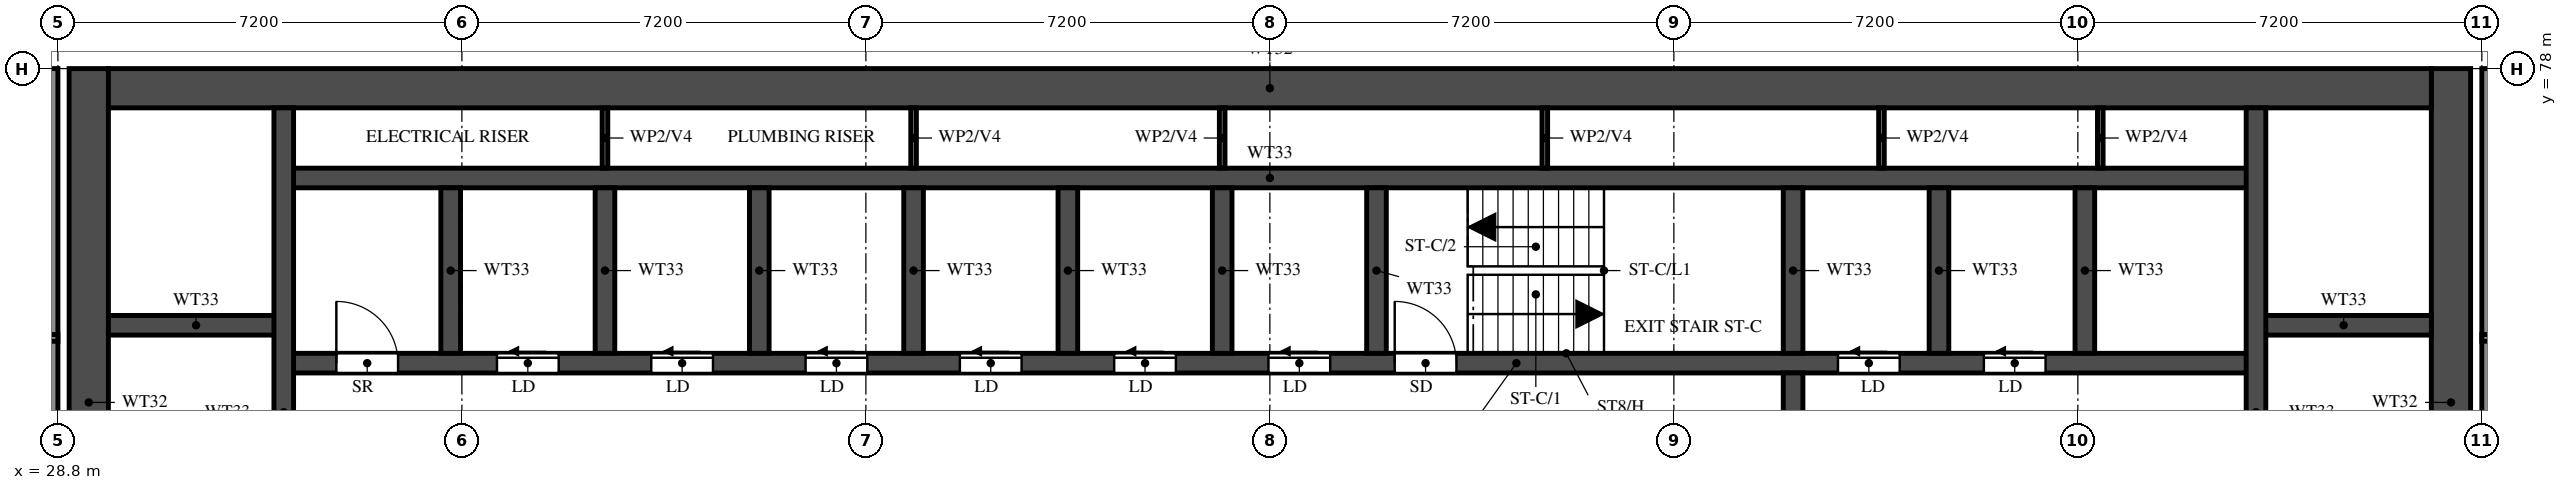
"""IFC4 building model, lengths in metres.
Left out: names, types, materials, properties, quantities, classifications, styles, units other than length and angle.
Written with IfcOpenShell. Run it as: python <this file> out.ifc"""

import sys

from ifc_helpers import new_model, si_unit, direction, frame, frame_2d, origin, place, context, subcontext, project, spatial, rectangle, extrude, element, fill, save


model = new_model("IFC4")
c1 = context("Model", 3, precision=1e-05, world=origin(), true_north=direction((0.0, 1.0)))
c2 = subcontext(c1, "Body", "Model", "MODEL_VIEW")
j1 = project(units=[si_unit("LENGTHUNIT", "METRE"), si_unit("PLANEANGLEUNIT", "RADIAN")], contexts=[c1])
p1 = place(None, origin())
s1 = spatial("IfcSite", under=j1, at=p1, CompositionType="ELEMENT")
p2 = place(p1, origin())
s2 = spatial("IfcBuilding", under=s1, at=p2, CompositionType="ELEMENT")
p3 = place(p2, frame((0.0, 0.0, 202.5)))
s3 = spatial("IfcBuildingStorey", under=s2, at=p3, CompositionType="ELEMENT", Elevation=202.5)
for number, where, z_axis, x_axis in (
    (1, (29.35, 66.1, 0.0), (0.0, 0.0, 1.0), (0.0, 1.0, 0.0)),
    (2, (71.45, 66.1, 0.0), (0.0, 0.0, 1.0), (0.0, 1.0, 0.0)),
):
    element("IfcWall", number, at=place(p3, frame(where, z_axis=z_axis, x_axis=x_axis)), inside=s3, PredefinedType="SHEAR", context=c2, shape_type="SweptSolid", body=[
        extrude(rectangle(XDim=11.9, YDim=0.7, at=frame_2d((5.95, 0.0))), origin(), (0.0, 0.0, 1.0), 3.1),
    ])
p4 = place(p3, frame((29.7, 77.65, 0.0), z_axis=(0.0, 0.0, 1.0), x_axis=(1.0, 0.0, 0.0)))
e3 = element("IfcWall", 3, at=p4, inside=s3, PredefinedType="SHEAR", context=c2, shape_type="SweptSolid", body=[
    extrude(rectangle(XDim=41.4, YDim=0.7, at=frame_2d((20.7, 0.0))), origin(), (0.0, 0.0, 1.0), 3.1),
])
p5 = place(p3, frame((32.825, 72.75, 0.0), z_axis=(0.0, 0.0, 1.0), x_axis=(1.0, 0.0, 0.0)))
e4 = element("IfcWall", 4, at=p5, inside=s3, PredefinedType="SHEAR", context=c2, shape_type="SweptSolid", body=[
    extrude(rectangle(XDim=35.15, YDim=0.35, at=frame_2d((17.575, 0.0))), origin(), (0.0, 0.0, 1.0), 3.1),
])
p6 = place(p5, frame((19.8, 0.0, 0.0)))
e5 = element("IfcOpeningElement", 5, at=p6, cuts=e4, PredefinedType="OPENING", context=c2, shape_type="SweptSolid", body=[
    extrude(rectangle(XDim=1.1, YDim=2.1, at=frame_2d((0.55, 1.05))), frame((0.0, 0.185, 0.0), z_axis=(0.0, -1.0, 0.0), x_axis=(1.0, 0.0, 0.0)), (0.0, 0.0, 1.0), 0.37),
])
p7 = place(p5, frame((27.7, 0.0, 0.0)))
e6 = element("IfcOpeningElement", 6, at=p7, cuts=e4, PredefinedType="OPENING", context=c2, shape_type="SweptSolid", body=[
    extrude(rectangle(XDim=1.1, YDim=2.1, at=frame_2d((0.55, 1.05))), frame((0.0, 0.185, 0.0), z_axis=(0.0, -1.0, 0.0), x_axis=(1.0, 0.0, 0.0)), (0.0, 0.0, 1.0), 0.37),
])
p8 = place(p5, frame((30.3, 0.0, 0.0)))
e7 = element("IfcOpeningElement", 7, at=p8, cuts=e4, PredefinedType="OPENING", context=c2, shape_type="SweptSolid", body=[
    extrude(rectangle(XDim=1.1, YDim=2.1, at=frame_2d((0.55, 1.05))), frame((0.0, 0.185, 0.0), z_axis=(0.0, -1.0, 0.0), x_axis=(1.0, 0.0, 0.0)), (0.0, 0.0, 1.0), 0.37),
])
p9 = place(p5, frame((3.8, 0.0, 0.0)))
e8 = element("IfcOpeningElement", 8, at=p9, cuts=e4, PredefinedType="OPENING", context=c2, shape_type="SweptSolid", body=[
    extrude(rectangle(XDim=1.1, YDim=2.1, at=frame_2d((0.55, 1.05))), frame((0.0, 0.185, 0.0), z_axis=(0.0, -1.0, 0.0), x_axis=(1.0, 0.0, 0.0)), (0.0, 0.0, 1.0), 0.37),
])
p10 = place(p5, frame((6.55, 0.0, 0.0)))
e9 = element("IfcOpeningElement", 9, at=p10, cuts=e4, PredefinedType="OPENING", context=c2, shape_type="SweptSolid", body=[
    extrude(rectangle(XDim=1.1, YDim=2.1, at=frame_2d((0.55, 1.05))), frame((0.0, 0.185, 0.0), z_axis=(0.0, -1.0, 0.0), x_axis=(1.0, 0.0, 0.0)), (0.0, 0.0, 1.0), 0.37),
])
p11 = place(p5, frame((9.3, 0.0, 0.0)))
e10 = element("IfcOpeningElement", 10, at=p11, cuts=e4, PredefinedType="OPENING", context=c2, shape_type="SweptSolid", body=[
    extrude(rectangle(XDim=1.1, YDim=2.1, at=frame_2d((0.55, 1.05))), frame((0.0, 0.185, 0.0), z_axis=(0.0, -1.0, 0.0), x_axis=(1.0, 0.0, 0.0)), (0.0, 0.0, 1.0), 0.37),
])
p12 = place(p5, frame((12.05, 0.0, 0.0)))
e11 = element("IfcOpeningElement", 11, at=p12, cuts=e4, PredefinedType="OPENING", context=c2, shape_type="SweptSolid", body=[
    extrude(rectangle(XDim=1.1, YDim=2.1, at=frame_2d((0.55, 1.05))), frame((0.0, 0.185, 0.0), z_axis=(0.0, -1.0, 0.0), x_axis=(1.0, 0.0, 0.0)), (0.0, 0.0, 1.0), 0.37),
])
p13 = place(p5, frame((14.8, 0.0, 0.0)))
e12 = element("IfcOpeningElement", 12, at=p13, cuts=e4, PredefinedType="OPENING", context=c2, shape_type="SweptSolid", body=[
    extrude(rectangle(XDim=1.1, YDim=2.1, at=frame_2d((0.55, 1.05))), frame((0.0, 0.185, 0.0), z_axis=(0.0, -1.0, 0.0), x_axis=(1.0, 0.0, 0.0)), (0.0, 0.0, 1.0), 0.37),
])
p14 = place(p5, frame((17.55, 0.0, 0.0)))
e13 = element("IfcOpeningElement", 13, at=p14, cuts=e4, PredefinedType="OPENING", context=c2, shape_type="SweptSolid", body=[
    extrude(rectangle(XDim=1.1, YDim=2.1, at=frame_2d((0.55, 1.05))), frame((0.0, 0.185, 0.0), z_axis=(0.0, -1.0, 0.0), x_axis=(1.0, 0.0, 0.0)), (0.0, 0.0, 1.0), 0.37),
])
p15 = place(p5, frame((0.938, 0.0, 0.0)))
e14 = element("IfcOpeningElement", 14, at=p15, cuts=e4, PredefinedType="OPENING", context=c2, shape_type="SweptSolid", body=[
    extrude(rectangle(XDim=1.1, YDim=2.1, at=frame_2d((0.55, 1.05))), frame((0.0, 0.185, 0.0), z_axis=(0.0, -1.0, 0.0), x_axis=(1.0, 0.0, 0.0)), (0.0, 0.0, 1.0), 0.37),
])
p16 = place(p3, frame((32.825, 76.05, 0.0), z_axis=(0.0, 0.0, 1.0), x_axis=(1.0, 0.0, 0.0)))
e15 = element("IfcWall", 15, at=p16, inside=s3, PredefinedType="SHEAR", context=c2, shape_type="SweptSolid", body=[
    extrude(rectangle(XDim=35.15, YDim=0.35, at=frame_2d((17.575, 0.0))), origin(), (0.0, 0.0, 1.0), 3.1),
])
for number, where, z_axis, x_axis in (
    (16, (29.7, 73.425, 0.0), (0.0, 0.0, 1.0), (1.0, 0.0, 0.0)),
    (17, (67.975, 73.425, 0.0), (0.0, 0.0, 1.0), (1.0, 0.0, 0.0)),
):
    element("IfcWall", number, at=place(p3, frame(where, z_axis=z_axis, x_axis=x_axis)), inside=s3, PredefinedType="SHEAR", context=c2, shape_type="SweptSolid", body=[
        extrude(rectangle(XDim=3.125, YDim=0.35, at=frame_2d((1.562, 0.0))), origin(), (0.0, 0.0, 1.0), 3.1),
    ])
p17 = place(p3, frame((32.825, 66.45, 0.0), z_axis=(0.0, 0.0, 1.0), x_axis=(0.0, 1.0, 0.0)))
e18 = element("IfcWall", 18, at=p17, inside=s3, PredefinedType="SHEAR", context=c2, shape_type="SweptSolid", body=[
    extrude(rectangle(XDim=10.85, YDim=0.35, at=frame_2d((5.425, 0.0))), origin(), (0.0, 0.0, 1.0), 3.1),
])
p18 = place(p3, frame((67.975, 66.45, 0.0), z_axis=(0.0, 0.0, 1.0), x_axis=(0.0, 1.0, 0.0)))
e19 = element("IfcWall", 19, at=p18, inside=s3, PredefinedType="SHEAR", context=c2, shape_type="SweptSolid", body=[
    extrude(rectangle(XDim=10.85, YDim=0.35, at=frame_2d((5.425, 0.0))), origin(), (0.0, 0.0, 1.0), 3.1),
])
p19 = place(p18, frame((0.15, 0.0, 0.0)))
e20 = element("IfcOpeningElement", 20, at=p19, cuts=e19, PredefinedType="OPENING", context=c2, shape_type="SweptSolid", body=[
    extrude(rectangle(XDim=1.1, YDim=2.1, at=frame_2d((0.55, 1.05))), frame((0.0, 0.185, 0.0), z_axis=(0.0, -1.0, 0.0), x_axis=(1.0, 0.0, 0.0)), (0.0, 0.0, 1.0), 0.37),
])
p20 = place(p3, frame((59.725, 66.45, 0.0), z_axis=(0.0, 0.0, 1.0), x_axis=(0.0, 1.0, 0.0)))
e21 = element("IfcWall", 21, at=p20, inside=s3, PredefinedType="SHEAR", context=c2, shape_type="SweptSolid", body=[
    extrude(rectangle(XDim=6.125, YDim=0.35, at=frame_2d((3.062, 0.0))), origin(), (0.0, 0.0, 1.0), 3.1),
])
p21 = place(p20, frame((3.85, 0.0, 0.0)))
e22 = element("IfcOpeningElement", 22, at=p21, cuts=e21, PredefinedType="OPENING", context=c2, shape_type="SweptSolid", body=[
    extrude(rectangle(XDim=1.2, YDim=2.1, at=frame_2d((0.6, 1.05))), frame((0.0, 0.185, 0.0), z_axis=(0.0, -1.0, 0.0), x_axis=(1.0, 0.0, 0.0)), (0.0, 0.0, 1.0), 0.37),
])
for number, where, z_axis, x_axis in (
    (23, (59.725, 72.925, 0.0), (0.0, 0.0, 1.0), (0.0, 1.0, 0.0)),
    (24, (35.8, 72.925, 0.0), (0.0, 0.0, 1.0), (0.0, 1.0, 0.0)),
    (25, (38.55, 72.925, 0.0), (0.0, 0.0, 1.0), (0.0, 1.0, 0.0)),
    (26, (41.3, 72.925, 0.0), (0.0, 0.0, 1.0), (0.0, 1.0, 0.0)),
    (27, (44.05, 72.925, 0.0), (0.0, 0.0, 1.0), (0.0, 1.0, 0.0)),
    (28, (46.8, 72.925, 0.0), (0.0, 0.0, 1.0), (0.0, 1.0, 0.0)),
    (29, (49.55, 72.925, 0.0), (0.0, 0.0, 1.0), (0.0, 1.0, 0.0)),
    (30, (52.3, 72.925, 0.0), (0.0, 0.0, 1.0), (0.0, 1.0, 0.0)),
    (31, (62.325, 72.925, 0.0), (0.0, 0.0, 1.0), (0.0, 1.0, 0.0)),
    (32, (64.925, 72.925, 0.0), (0.0, 0.0, 1.0), (0.0, 1.0, 0.0)),
):
    element("IfcWall", number, at=place(p3, frame(where, z_axis=z_axis, x_axis=x_axis)), inside=s3, PredefinedType="SHEAR", context=c2, shape_type="SweptSolid", body=[
        extrude(rectangle(XDim=2.95, YDim=0.35, at=frame_2d((1.475, 0.0))), origin(), (0.0, 0.0, 1.0), 3.1),
    ])
for number, where, z_axis, x_axis in (
    (33, (38.55, 76.225, 0.0), (0.0, 0.0, 1.0), (0.0, 1.0, 0.0)),
    (34, (44.05, 76.225, 0.0), (0.0, 0.0, 1.0), (0.0, 1.0, 0.0)),
    (35, (49.55, 76.225, 0.0), (0.0, 0.0, 1.0), (0.0, 1.0, 0.0)),
    (36, (55.3, 76.225, 0.0), (0.0, 0.0, 1.0), (0.0, 1.0, 0.0)),
    (37, (61.3, 76.225, 0.0), (0.0, 0.0, 1.0), (0.0, 1.0, 0.0)),
    (38, (65.2, 76.225, 0.0), (0.0, 0.0, 1.0), (0.0, 1.0, 0.0)),
):
    element("IfcWall", number, at=place(p3, frame(where, z_axis=z_axis, x_axis=x_axis)), inside=s3, PredefinedType="PARTITIONING", context=c2, shape_type="SweptSolid", body=[
        extrude(rectangle(XDim=1.075, YDim=0.1, at=frame_2d((0.538, 0.0))), origin(), (0.0, 0.0, 1.0), 3.1),
    ])
for number, where, z_axis, x_axis in (
    (39, (28.7, 62.4, 0.0), (0.0, 0.0, 1.0), (0.0, 1.0, 0.0)),
    (40, (72.1, 62.4, 0.0), (0.0, 0.0, 1.0), (0.0, 1.0, 0.0)),
):
    element("IfcWall", number, at=place(p3, frame(where, z_axis=z_axis, x_axis=x_axis)), inside=s3, PredefinedType="SOLIDWALL", context=c2, shape_type="SweptSolid", body=[
        extrude(rectangle(XDim=15.6, YDim=0.2, at=frame_2d((7.8, 0.0))), origin(), (0.0, 0.0, 1.0), 3.1),
    ])
p22 = place(p3, frame((14.525, 73.2, 0.0), z_axis=(0.0, 0.0, 1.0), x_axis=(1.0, 0.0, 0.0)))
e41 = element("IfcWall", 41, at=p22, inside=s3, PredefinedType="PARTITIONING", context=c2, shape_type="SweptSolid", body=[
    extrude(rectangle(XDim=14.275, YDim=0.12, at=frame_2d((7.138, 0.0))), origin(), (0.0, 0.0, 1.0), 3.1),
])
p23 = place(p22, frame((7.675, 0.0, 0.0)))
e42 = element("IfcOpeningElement", 42, at=p23, cuts=e41, PredefinedType="OPENING", context=c2, shape_type="SweptSolid", body=[
    extrude(rectangle(XDim=0.9, YDim=2.1, at=frame_2d((0.45, 1.05))), frame((0.0, 0.07, 0.0), z_axis=(0.0, -1.0, 0.0), x_axis=(1.0, 0.0, 0.0)), (0.0, 0.0, 1.0), 0.14),
])
p24 = place(p3, frame((72.0, 73.2, 0.0), z_axis=(0.0, 0.0, 1.0), x_axis=(1.0, 0.0, 0.0)))
e43 = element("IfcWall", 43, at=p24, inside=s3, PredefinedType="PARTITIONING", context=c2, shape_type="SweptSolid", body=[
    extrude(rectangle(XDim=14.275, YDim=0.12, at=frame_2d((7.137, 0.0))), origin(), (0.0, 0.0, 1.0), 3.1),
])
p25 = place(p24, frame((5.7, 0.0, 0.0)))
e44 = element("IfcOpeningElement", 44, at=p25, cuts=e43, PredefinedType="OPENING", context=c2, shape_type="SweptSolid", body=[
    extrude(rectangle(XDim=0.9, YDim=2.1, at=frame_2d((0.45, 1.05))), frame((0.0, 0.07, 0.0), z_axis=(0.0, -1.0, 0.0), x_axis=(1.0, 0.0, 0.0)), (0.0, 0.0, 1.0), 0.14),
])
p26 = place(p6, origin())
e45 = element("IfcDoor", 45, at=p26, inside=s3, OperationType="SINGLE_SWING_LEFT", PredefinedType="DOOR", context=c2, shape_type="SweptSolid", body=[
    extrude(rectangle(XDim=1.1, YDim=2.1, at=frame_2d((0.55, 1.05))), frame((0.0, 0.025, 0.0), z_axis=(0.0, -1.0, 0.0), x_axis=(1.0, 0.0, 0.0)), (0.0, 0.0, 1.0), 0.05),
])
fill(e5, e45)
p27 = place(p7, origin())
e46 = element("IfcDoor", 46, at=p27, inside=s3, OperationType="SLIDING_TO_LEFT", PredefinedType="DOOR", context=c2, shape_type="SweptSolid", body=[
    extrude(rectangle(XDim=1.1, YDim=2.1, at=frame_2d((0.55, 1.05))), frame((0.0, 0.025, 0.0), z_axis=(0.0, -1.0, 0.0), x_axis=(1.0, 0.0, 0.0)), (0.0, 0.0, 1.0), 0.05),
])
fill(e6, e46)
p28 = place(p8, origin())
e47 = element("IfcDoor", 47, at=p28, inside=s3, OperationType="SLIDING_TO_LEFT", PredefinedType="DOOR", context=c2, shape_type="SweptSolid", body=[
    extrude(rectangle(XDim=1.1, YDim=2.1, at=frame_2d((0.55, 1.05))), frame((0.0, 0.025, 0.0), z_axis=(0.0, -1.0, 0.0), x_axis=(1.0, 0.0, 0.0)), (0.0, 0.0, 1.0), 0.05),
])
fill(e7, e47)
p29 = place(p9, origin())
e48 = element("IfcDoor", 48, at=p29, inside=s3, OperationType="SLIDING_TO_LEFT", PredefinedType="DOOR", context=c2, shape_type="SweptSolid", body=[
    extrude(rectangle(XDim=1.1, YDim=2.1, at=frame_2d((0.55, 1.05))), frame((0.0, 0.025, 0.0), z_axis=(0.0, -1.0, 0.0), x_axis=(1.0, 0.0, 0.0)), (0.0, 0.0, 1.0), 0.05),
])
fill(e8, e48)
p30 = place(p10, origin())
e49 = element("IfcDoor", 49, at=p30, inside=s3, OperationType="SLIDING_TO_LEFT", PredefinedType="DOOR", context=c2, shape_type="SweptSolid", body=[
    extrude(rectangle(XDim=1.1, YDim=2.1, at=frame_2d((0.55, 1.05))), frame((0.0, 0.025, 0.0), z_axis=(0.0, -1.0, 0.0), x_axis=(1.0, 0.0, 0.0)), (0.0, 0.0, 1.0), 0.05),
])
fill(e9, e49)
p31 = place(p11, origin())
e50 = element("IfcDoor", 50, at=p31, inside=s3, OperationType="SLIDING_TO_LEFT", PredefinedType="DOOR", context=c2, shape_type="SweptSolid", body=[
    extrude(rectangle(XDim=1.1, YDim=2.1, at=frame_2d((0.55, 1.05))), frame((0.0, 0.025, 0.0), z_axis=(0.0, -1.0, 0.0), x_axis=(1.0, 0.0, 0.0)), (0.0, 0.0, 1.0), 0.05),
])
fill(e10, e50)
p32 = place(p12, origin())
e51 = element("IfcDoor", 51, at=p32, inside=s3, OperationType="SLIDING_TO_LEFT", PredefinedType="DOOR", context=c2, shape_type="SweptSolid", body=[
    extrude(rectangle(XDim=1.1, YDim=2.1, at=frame_2d((0.55, 1.05))), frame((0.0, 0.025, 0.0), z_axis=(0.0, -1.0, 0.0), x_axis=(1.0, 0.0, 0.0)), (0.0, 0.0, 1.0), 0.05),
])
fill(e11, e51)
p33 = place(p13, origin())
e52 = element("IfcDoor", 52, at=p33, inside=s3, OperationType="SLIDING_TO_LEFT", PredefinedType="DOOR", context=c2, shape_type="SweptSolid", body=[
    extrude(rectangle(XDim=1.1, YDim=2.1, at=frame_2d((0.55, 1.05))), frame((0.0, 0.025, 0.0), z_axis=(0.0, -1.0, 0.0), x_axis=(1.0, 0.0, 0.0)), (0.0, 0.0, 1.0), 0.05),
])
fill(e12, e52)
p34 = place(p14, origin())
e53 = element("IfcDoor", 53, at=p34, inside=s3, OperationType="SLIDING_TO_LEFT", PredefinedType="DOOR", context=c2, shape_type="SweptSolid", body=[
    extrude(rectangle(XDim=1.1, YDim=2.1, at=frame_2d((0.55, 1.05))), frame((0.0, 0.025, 0.0), z_axis=(0.0, -1.0, 0.0), x_axis=(1.0, 0.0, 0.0)), (0.0, 0.0, 1.0), 0.05),
])
fill(e13, e53)
p35 = place(p15, origin())
e54 = element("IfcDoor", 54, at=p35, inside=s3, OperationType="SINGLE_SWING_LEFT", PredefinedType="DOOR", context=c2, shape_type="SweptSolid", body=[
    extrude(rectangle(XDim=1.1, YDim=2.1, at=frame_2d((0.55, 1.05))), frame((0.0, 0.025, 0.0), z_axis=(0.0, -1.0, 0.0), x_axis=(1.0, 0.0, 0.0)), (0.0, 0.0, 1.0), 0.05),
])
fill(e14, e54)
save(model, sys.argv[1])
